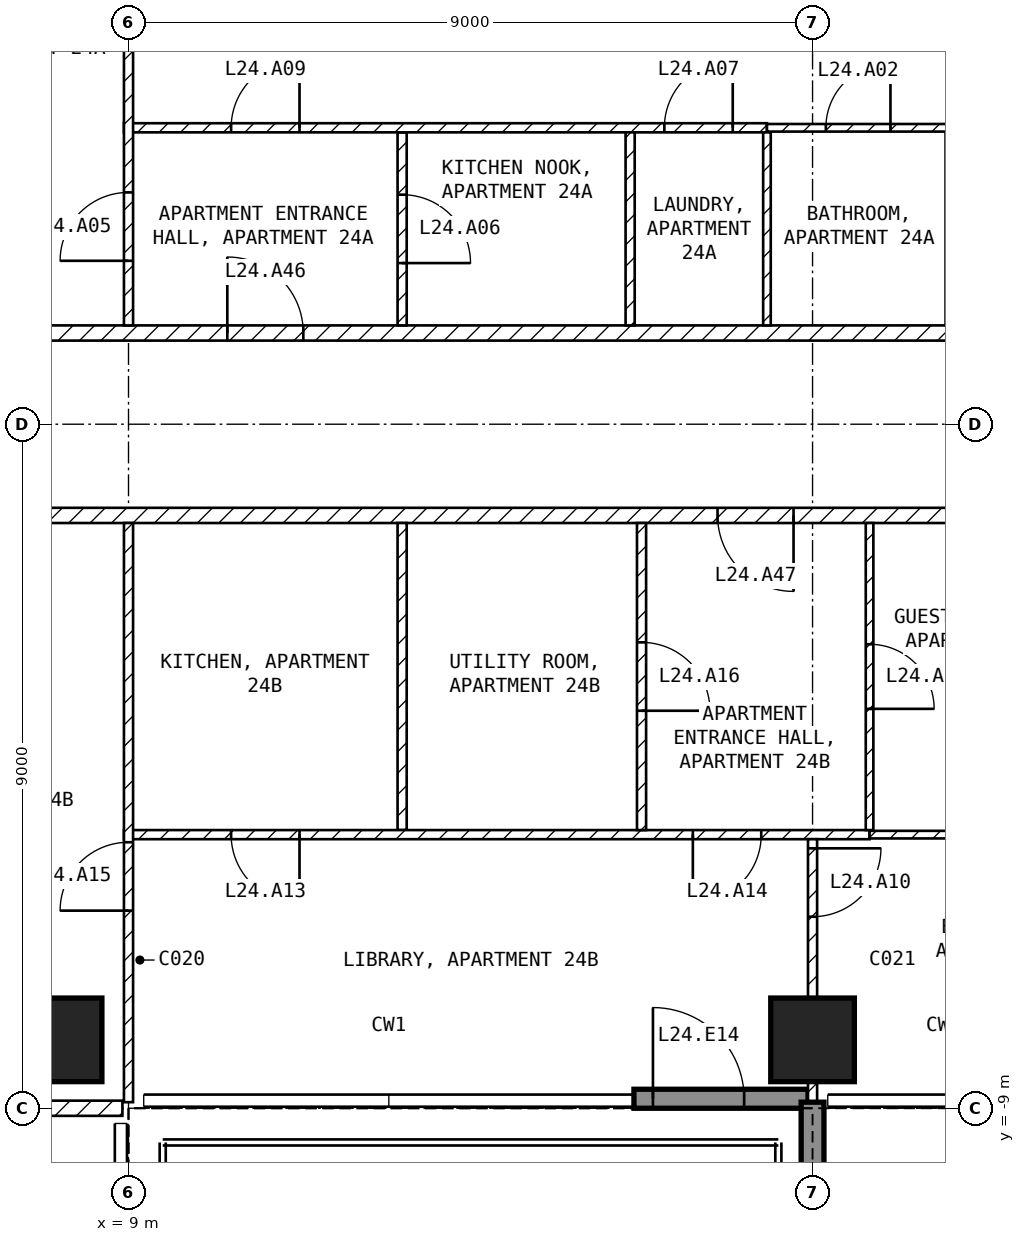
"""IFC4 building model, lengths in metres.
Left out: names, types, materials, properties, quantities, classifications, styles, units other than length and angle.
Written with IfcOpenShell. Run it as: python <this file> out.ifc"""

import sys

from ifc_helpers import new_model, si_unit, direction, frame, frame_2d, origin, origin_2d, place, context, subcontext, project, spatial, rectangle, extrude, element, fill, save


model = new_model("IFC4")
c1 = context("Model", 3, precision=1e-05, world=origin(), true_north=direction((0.0, 1.0)))
c2 = subcontext(c1, "Body", "Model", "MODEL_VIEW")
j1 = project(units=[si_unit("LENGTHUNIT", "METRE"), si_unit("PLANEANGLEUNIT", "RADIAN")], contexts=[c1])
p1 = place(None, origin())
s1 = spatial("IfcSite", under=j1, at=p1, CompositionType="ELEMENT")
p2 = place(p1, origin())
s2 = spatial("IfcBuilding", under=s1, at=p2, CompositionType="ELEMENT")
p3 = place(p2, frame((0.0, 0.0, 105.9)))
s3 = spatial("IfcBuildingStorey", under=s2, at=p3, CompositionType="ELEMENT", Elevation=105.9)
for number, where, z_axis, x_axis in (
    (1, (8.1, -8.1, -0.25), (0.0, 0.0, 1.0), (1.0, 0.0, 0.0)),
    (2, (18.0, -8.1, -0.25), (0.0, 0.0, 1.0), (1.0, 0.0, 0.0)),
):
    element("IfcColumn", number, at=place(p3, frame(where, z_axis=z_axis, x_axis=x_axis)), inside=s3, PredefinedType="COLUMN", context=c2, shape_type="SweptSolid", body=[
        extrude(rectangle(XDim=1.1, YDim=1.1, at=origin_2d()), origin(), (0.0, 0.0, 1.0), 3.5),
    ])
p4 = place(p3, frame((15.65, -8.875, 0.0), z_axis=(0.0, 0.0, 1.0), x_axis=(1.0, 0.0, 0.0)))
e3 = element("IfcWall", 3, at=p4, inside=s3, PredefinedType="SOLIDWALL", context=c2, shape_type="SweptSolid", body=[
    extrude(rectangle(XDim=2.29, YDim=0.25, at=frame_2d((1.145, 0.0))), origin(), (0.0, 0.0, 1.0), 3.25),
])
p5 = place(p4, frame((0.25, 0.0, 0.0)))
e4 = element("IfcOpeningElement", 4, at=p5, cuts=e3, PredefinedType="OPENING", context=c2, shape_type="SweptSolid", body=[
    extrude(rectangle(XDim=1.2, YDim=2.4, at=frame_2d((0.6, 1.2))), frame((0.0, 0.135, 0.0), z_axis=(0.0, -1.0, 0.0), x_axis=(1.0, 0.0, 0.0)), (0.0, 0.0, 1.0), 0.27),
])
p6 = place(p3, frame((18.0, -8.92, 0.0), z_axis=(0.0, 0.0, 1.0), x_axis=(0.0, -1.0, 0.0)))
e5 = element("IfcWall", 5, at=p6, inside=s3, PredefinedType="SOLIDWALL", context=c2, shape_type="SweptSolid", body=[
    extrude(rectangle(XDim=2.82, YDim=0.3, at=frame_2d((1.41, 0.0))), origin(), (0.0, 0.0, 1.0), 3.25),
])
p7 = place(p3, frame((4.4, 1.2, 0.0), z_axis=(0.0, 0.0, 1.0), x_axis=(1.0, 0.0, 0.0)))
e6 = element("IfcWall", 6, at=p7, inside=s3, PredefinedType="PARTITIONING", context=c2, shape_type="SweptSolid", body=[
    extrude(rectangle(XDim=17.2, YDim=0.2, at=frame_2d((8.6, 0.0))), origin(), (0.0, 0.0, 1.0), 3.25),
])
p8 = place(p7, frame((5.9, 0.0, 0.0)))
e7 = element("IfcOpeningElement", 7, at=p8, cuts=e6, PredefinedType="OPENING", context=c2, shape_type="SweptSolid", body=[
    extrude(rectangle(XDim=1.0, YDim=2.1, at=frame_2d((0.5, 1.05))), frame((0.0, 0.11, 0.0), z_axis=(0.0, -1.0, 0.0), x_axis=(1.0, 0.0, 0.0)), (0.0, 0.0, 1.0), 0.22),
])
p9 = place(p3, frame((21.6, -1.2, 0.0), z_axis=(0.0, 0.0, 1.0), x_axis=(-1.0, 0.0, 0.0)))
e8 = element("IfcWall", 8, at=p9, inside=s3, PredefinedType="PARTITIONING", context=c2, shape_type="SweptSolid", body=[
    extrude(rectangle(XDim=17.2, YDim=0.2, at=frame_2d((8.6, 0.0))), origin(), (0.0, 0.0, 1.0), 3.25),
])
p10 = place(p9, frame((3.85, 0.0, 0.0)))
e9 = element("IfcOpeningElement", 9, at=p10, cuts=e8, PredefinedType="OPENING", context=c2, shape_type="SweptSolid", body=[
    extrude(rectangle(XDim=1.0, YDim=2.1, at=frame_2d((0.5, 1.05))), frame((0.0, 0.11, 0.0), z_axis=(0.0, -1.0, 0.0), x_axis=(1.0, 0.0, 0.0)), (0.0, 0.0, 1.0), 0.22),
])
p11 = place(p3, frame((8.92, -9.0, 0.0), z_axis=(0.0, 0.0, 1.0), x_axis=(-1.0, 0.0, 0.0)))
e10 = element("IfcWall", 10, at=p11, inside=s3, PredefinedType="PARTITIONING", context=c2, shape_type="SweptSolid", body=[
    extrude(rectangle(XDim=17.84, YDim=0.2, at=frame_2d((8.92, 0.0))), origin(), (0.0, 0.0, 1.0), 3.25),
])
p12 = place(p11, frame((8.42, 0.0, 0.0)))
e11 = element("IfcOpeningElement", 11, at=p12, cuts=e10, PredefinedType="OPENING", context=c2, shape_type="SweptSolid", body=[
    extrude(rectangle(XDim=1.0, YDim=2.1, at=frame_2d((0.5, 1.05))), frame((0.0, 0.11, 0.0), z_axis=(0.0, -1.0, 0.0), x_axis=(1.0, 0.0, 0.0)), (0.0, 0.0, 1.0), 0.22),
])
p13 = place(p3, frame((12.6, 3.84, 0.0), z_axis=(0.0, 0.0, 1.0), x_axis=(0.0, -1.0, 0.0)))
e12 = element("IfcWall", 12, at=p13, inside=s3, PredefinedType="PARTITIONING", context=c2, shape_type="SweptSolid", body=[
    extrude(rectangle(XDim=2.54, YDim=0.12, at=frame_2d((1.27, 0.0))), origin(), (0.0, 0.0, 1.0), 3.25),
])
p14 = place(p13, frame((0.82, 0.0, 0.0)))
e13 = element("IfcOpeningElement", 13, at=p14, cuts=e12, PredefinedType="OPENING", context=c2, shape_type="SweptSolid", body=[
    extrude(rectangle(XDim=0.9, YDim=2.1, at=frame_2d((0.45, 1.05))), frame((0.0, 0.07, 0.0), z_axis=(0.0, -1.0, 0.0), x_axis=(1.0, 0.0, 0.0)), (0.0, 0.0, 1.0), 0.14),
])
p15 = place(p3, frame((8.94, 3.9, 0.0), z_axis=(0.0, 0.0, 1.0), x_axis=(1.0, 0.0, 0.0)))
e14 = element("IfcWall", 14, at=p15, inside=s3, PredefinedType="PARTITIONING", context=c2, shape_type="SweptSolid", body=[
    extrude(rectangle(XDim=8.46, YDim=0.12, at=frame_2d((4.23, 0.0))), origin(), (0.0, 0.0, 1.0), 3.25),
])
p16 = place(p15, frame((7.11, 0.0, 0.0)))
e15 = element("IfcOpeningElement", 15, at=p16, cuts=e14, PredefinedType="OPENING", context=c2, shape_type="SweptSolid", body=[
    extrude(rectangle(XDim=0.9, YDim=2.1, at=frame_2d((0.45, 1.05))), frame((0.0, 0.07, 0.0), z_axis=(0.0, -1.0, 0.0), x_axis=(1.0, 0.0, 0.0)), (0.0, 0.0, 1.0), 0.14),
])
p17 = place(p15, frame((1.41, 0.0, 0.0)))
e16 = element("IfcOpeningElement", 16, at=p17, cuts=e14, PredefinedType="OPENING", context=c2, shape_type="SweptSolid", body=[
    extrude(rectangle(XDim=0.9, YDim=2.1, at=frame_2d((0.45, 1.05))), frame((0.0, 0.07, 0.0), z_axis=(0.0, -1.0, 0.0), x_axis=(1.0, 0.0, 0.0)), (0.0, 0.0, 1.0), 0.14),
])
p18 = place(p3, frame((9.0, 1.3, 0.0), z_axis=(0.0, 0.0, 1.0), x_axis=(0.0, 1.0, 0.0)))
e17 = element("IfcWall", 17, at=p18, inside=s3, PredefinedType="PARTITIONING", context=c2, shape_type="SweptSolid", body=[
    extrude(rectangle(XDim=7.62, YDim=0.12, at=frame_2d((3.81, 0.0))), origin(), (0.0, 0.0, 1.0), 3.25),
])
p19 = place(p18, frame((0.85, 0.0, 0.0)))
e18 = element("IfcOpeningElement", 18, at=p19, cuts=e17, PredefinedType="OPENING", context=c2, shape_type="SweptSolid", body=[
    extrude(rectangle(XDim=0.9, YDim=2.1, at=frame_2d((0.45, 1.05))), frame((0.0, 0.07, 0.0), z_axis=(0.0, -1.0, 0.0), x_axis=(1.0, 0.0, 0.0)), (0.0, 0.0, 1.0), 0.14),
])
p20 = place(p3, frame((15.6, 3.84, 0.0), z_axis=(0.0, 0.0, 1.0), x_axis=(0.0, -1.0, 0.0)))
e19 = element("IfcWall", 19, at=p20, inside=s3, PredefinedType="PARTITIONING", context=c2, shape_type="SweptSolid", body=[
    extrude(rectangle(XDim=2.54, YDim=0.12, at=frame_2d((1.27, 0.0))), origin(), (0.0, 0.0, 1.0), 3.25),
])
p21 = place(p3, frame((17.4, 3.84, 0.0), z_axis=(0.0, 0.0, 1.0), x_axis=(0.0, -1.0, 0.0)))
e20 = element("IfcWall", 20, at=p21, inside=s3, PredefinedType="PARTITIONING", context=c2, shape_type="SweptSolid", body=[
    extrude(rectangle(XDim=2.54, YDim=0.1, at=frame_2d((1.27, 0.0))), origin(), (0.0, 0.0, 1.0), 3.25),
])
p22 = place(p3, frame((17.4, 3.9, 0.0), z_axis=(0.0, 0.0, 1.0), x_axis=(1.0, 0.0, 0.0)))
e21 = element("IfcWall", 21, at=p22, inside=s3, PredefinedType="PARTITIONING", context=c2, shape_type="SweptSolid", body=[
    extrude(rectangle(XDim=2.4, YDim=0.1, at=frame_2d((1.2, 0.0))), origin(), (0.0, 0.0, 1.0), 3.25),
])
p23 = place(p22, frame((0.775, 0.0, 0.0)))
e22 = element("IfcOpeningElement", 22, at=p23, cuts=e21, PredefinedType="OPENING", context=c2, shape_type="SweptSolid", body=[
    extrude(rectangle(XDim=0.85, YDim=2.1, at=frame_2d((0.425, 1.05))), frame((0.0, 0.06, 0.0), z_axis=(0.0, -1.0, 0.0), x_axis=(1.0, 0.0, 0.0)), (0.0, 0.0, 1.0), 0.12),
])
p24 = place(p3, frame((12.6, -1.3, 0.0), z_axis=(0.0, 0.0, 1.0), x_axis=(0.0, -1.0, 0.0)))
e23 = element("IfcWall", 23, at=p24, inside=s3, PredefinedType="PARTITIONING", context=c2, shape_type="SweptSolid", body=[
    extrude(rectangle(XDim=4.04, YDim=0.12, at=frame_2d((2.02, 0.0))), origin(), (0.0, 0.0, 1.0), 3.25),
])
p25 = place(p3, frame((18.75, -5.4, 0.0), z_axis=(0.0, 0.0, 1.0), x_axis=(-1.0, 0.0, 0.0)))
e24 = element("IfcWall", 24, at=p25, inside=s3, PredefinedType="PARTITIONING", context=c2, shape_type="SweptSolid", body=[
    extrude(rectangle(XDim=9.81, YDim=0.12, at=frame_2d((4.905, 0.0))), origin(), (0.0, 0.0, 1.0), 3.25),
])
p26 = place(p25, frame((7.5, 0.0, 0.0)))
e25 = element("IfcOpeningElement", 25, at=p26, cuts=e24, PredefinedType="OPENING", context=c2, shape_type="SweptSolid", body=[
    extrude(rectangle(XDim=0.9, YDim=2.1, at=frame_2d((0.45, 1.05))), frame((0.0, 0.07, 0.0), z_axis=(0.0, -1.0, 0.0), x_axis=(1.0, 0.0, 0.0)), (0.0, 0.0, 1.0), 0.14),
])
p27 = place(p25, frame((1.425, 0.0, 0.0)))
e26 = element("IfcOpeningElement", 26, at=p27, cuts=e24, PredefinedType="OPENING", context=c2, shape_type="SweptSolid", body=[
    extrude(rectangle(XDim=0.9, YDim=2.1, at=frame_2d((0.45, 1.05))), frame((0.0, 0.07, 0.0), z_axis=(0.0, -1.0, 0.0), x_axis=(1.0, 0.0, 0.0)), (0.0, 0.0, 1.0), 0.14),
])
p28 = place(p3, frame((9.0, -8.92, 0.0), z_axis=(0.0, 0.0, 1.0), x_axis=(0.0, 1.0, 0.0)))
e27 = element("IfcWall", 27, at=p28, inside=s3, PredefinedType="PARTITIONING", context=c2, shape_type="SweptSolid", body=[
    extrude(rectangle(XDim=7.62, YDim=0.12, at=frame_2d((3.81, 0.0))), origin(), (0.0, 0.0, 1.0), 3.25),
])
p29 = place(p28, frame((2.52, 0.0, 0.0)))
e28 = element("IfcOpeningElement", 28, at=p29, cuts=e27, PredefinedType="OPENING", context=c2, shape_type="SweptSolid", body=[
    extrude(rectangle(XDim=0.9, YDim=2.1, at=frame_2d((0.45, 1.05))), frame((0.0, 0.07, 0.0), z_axis=(0.0, -1.0, 0.0), x_axis=(1.0, 0.0, 0.0)), (0.0, 0.0, 1.0), 0.14),
])
p30 = place(p3, frame((15.75, -1.3, 0.0), z_axis=(0.0, 0.0, 1.0), x_axis=(0.0, -1.0, 0.0)))
e29 = element("IfcWall", 29, at=p30, inside=s3, PredefinedType="PARTITIONING", context=c2, shape_type="SweptSolid", body=[
    extrude(rectangle(XDim=4.04, YDim=0.12, at=frame_2d((2.02, 0.0))), origin(), (0.0, 0.0, 1.0), 3.25),
])
p31 = place(p30, frame((1.57, 0.0, 0.0)))
e30 = element("IfcOpeningElement", 30, at=p31, cuts=e29, PredefinedType="OPENING", context=c2, shape_type="SweptSolid", body=[
    extrude(rectangle(XDim=0.9, YDim=2.1, at=frame_2d((0.45, 1.05))), frame((0.0, 0.07, 0.0), z_axis=(0.0, -1.0, 0.0), x_axis=(1.0, 0.0, 0.0)), (0.0, 0.0, 1.0), 0.14),
])
p32 = place(p3, frame((18.75, -1.3, 0.0), z_axis=(0.0, 0.0, 1.0), x_axis=(0.0, -1.0, 0.0)))
e31 = element("IfcWall", 31, at=p32, inside=s3, PredefinedType="PARTITIONING", context=c2, shape_type="SweptSolid", body=[
    extrude(rectangle(XDim=4.04, YDim=0.1, at=frame_2d((2.02, 0.0))), origin(), (0.0, 0.0, 1.0), 3.25),
])
p33 = place(p32, frame((1.595, 0.0, 0.0)))
e32 = element("IfcOpeningElement", 32, at=p33, cuts=e31, PredefinedType="OPENING", context=c2, shape_type="SweptSolid", body=[
    extrude(rectangle(XDim=0.85, YDim=2.1, at=frame_2d((0.425, 1.05))), frame((0.0, 0.06, 0.0), z_axis=(0.0, -1.0, 0.0), x_axis=(1.0, 0.0, 0.0)), (0.0, 0.0, 1.0), 0.12),
])
p34 = place(p3, frame((21.6, -5.4, 0.0), z_axis=(0.0, 0.0, 1.0), x_axis=(-1.0, 0.0, 0.0)))
e33 = element("IfcWall", 33, at=p34, inside=s3, PredefinedType="PARTITIONING", context=c2, shape_type="SweptSolid", body=[
    extrude(rectangle(XDim=2.85, YDim=0.1, at=frame_2d((1.425, 0.0))), origin(), (0.0, 0.0, 1.0), 3.25),
])
p35 = place(p3, frame((18.0, -5.46, 0.0), z_axis=(0.0, 0.0, 1.0), x_axis=(0.0, -1.0, 0.0)))
e34 = element("IfcWall", 34, at=p35, inside=s3, PredefinedType="PARTITIONING", context=c2, shape_type="SweptSolid", body=[
    extrude(rectangle(XDim=3.46, YDim=0.12, at=frame_2d((1.73, 0.0))), origin(), (0.0, 0.0, 1.0), 2.414),
])
p36 = place(p35, frame((0.12, 0.0, 0.0)))
e35 = element("IfcOpeningElement", 35, at=p36, cuts=e34, PredefinedType="OPENING", context=c2, shape_type="SweptSolid", body=[
    extrude(rectangle(XDim=0.9, YDim=2.1, at=frame_2d((0.45, 1.05))), frame((0.0, 0.07, 0.0), z_axis=(0.0, -1.0, 0.0), x_axis=(1.0, 0.0, 0.0)), (0.0, 0.0, 1.0), 0.14),
])
p37 = place(p5, origin())
e36 = element("IfcDoor", 36, at=p37, inside=s3, OperationType="SINGLE_SWING_LEFT", PredefinedType="DOOR", context=c2, shape_type="SweptSolid", body=[
    extrude(rectangle(XDim=1.2, YDim=2.4, at=frame_2d((0.6, 1.2))), frame((0.0, 0.025, 0.0), z_axis=(0.0, -1.0, 0.0), x_axis=(1.0, 0.0, 0.0)), (0.0, 0.0, 1.0), 0.05),
])
fill(e4, e36)
p38 = place(p23, origin())
e37 = element("IfcDoor", 37, at=p38, inside=s3, OperationType="SINGLE_SWING_RIGHT", PredefinedType="DOOR", context=c2, shape_type="SweptSolid", body=[
    extrude(rectangle(XDim=0.85, YDim=2.1, at=frame_2d((0.425, 1.05))), frame((0.0, 0.025, 0.0), z_axis=(0.0, -1.0, 0.0), x_axis=(1.0, 0.0, 0.0)), (0.0, 0.0, 1.0), 0.05),
])
fill(e22, e37)
p39 = place(p19, origin())
e38 = element("IfcDoor", 38, at=p39, inside=s3, OperationType="SINGLE_SWING_LEFT", PredefinedType="DOOR", context=c2, shape_type="SweptSolid", body=[
    extrude(rectangle(XDim=0.9, YDim=2.1, at=frame_2d((0.45, 1.05))), frame((0.0, 0.025, 0.0), z_axis=(0.0, -1.0, 0.0), x_axis=(1.0, 0.0, 0.0)), (0.0, 0.0, 1.0), 0.05),
])
fill(e18, e38)
p40 = place(p14, origin())
e39 = element("IfcDoor", 39, at=p40, inside=s3, OperationType="SINGLE_SWING_RIGHT", PredefinedType="DOOR", context=c2, shape_type="SweptSolid", body=[
    extrude(rectangle(XDim=0.9, YDim=2.1, at=frame_2d((0.45, 1.05))), frame((0.0, 0.025, 0.0), z_axis=(0.0, -1.0, 0.0), x_axis=(1.0, 0.0, 0.0)), (0.0, 0.0, 1.0), 0.05),
])
fill(e13, e39)
p41 = place(p16, origin())
e40 = element("IfcDoor", 40, at=p41, inside=s3, OperationType="SINGLE_SWING_RIGHT", PredefinedType="DOOR", context=c2, shape_type="SweptSolid", body=[
    extrude(rectangle(XDim=0.9, YDim=2.1, at=frame_2d((0.45, 1.05))), frame((0.0, 0.025, 0.0), z_axis=(0.0, -1.0, 0.0), x_axis=(1.0, 0.0, 0.0)), (0.0, 0.0, 1.0), 0.05),
])
fill(e15, e40)
p42 = place(p17, origin())
e41 = element("IfcDoor", 41, at=p42, inside=s3, OperationType="SINGLE_SWING_RIGHT", PredefinedType="DOOR", context=c2, shape_type="SweptSolid", body=[
    extrude(rectangle(XDim=0.9, YDim=2.1, at=frame_2d((0.45, 1.05))), frame((0.0, 0.025, 0.0), z_axis=(0.0, -1.0, 0.0), x_axis=(1.0, 0.0, 0.0)), (0.0, 0.0, 1.0), 0.05),
])
fill(e16, e41)
p43 = place(p36, origin())
e42 = element("IfcDoor", 42, at=p43, inside=s3, OperationType="SINGLE_SWING_LEFT", PredefinedType="DOOR", context=c2, shape_type="SweptSolid", body=[
    extrude(rectangle(XDim=0.9, YDim=2.1, at=frame_2d((0.45, 1.05))), frame((0.0, 0.025, 0.0), z_axis=(0.0, -1.0, 0.0), x_axis=(1.0, 0.0, 0.0)), (0.0, 0.0, 1.0), 0.05),
])
fill(e35, e42)
p44 = place(p33, origin())
e43 = element("IfcDoor", 43, at=p44, inside=s3, OperationType="SINGLE_SWING_RIGHT", PredefinedType="DOOR", context=c2, shape_type="SweptSolid", body=[
    extrude(rectangle(XDim=0.85, YDim=2.1, at=frame_2d((0.425, 1.05))), frame((0.0, 0.025, 0.0), z_axis=(0.0, -1.0, 0.0), x_axis=(1.0, 0.0, 0.0)), (0.0, 0.0, 1.0), 0.05),
])
fill(e32, e43)
p45 = place(p26, origin())
e44 = element("IfcDoor", 44, at=p45, inside=s3, OperationType="SINGLE_SWING_LEFT", PredefinedType="DOOR", context=c2, shape_type="SweptSolid", body=[
    extrude(rectangle(XDim=0.9, YDim=2.1, at=frame_2d((0.45, 1.05))), frame((0.0, 0.025, 0.0), z_axis=(0.0, -1.0, 0.0), x_axis=(1.0, 0.0, 0.0)), (0.0, 0.0, 1.0), 0.05),
])
fill(e25, e44)
p46 = place(p27, origin())
e45 = element("IfcDoor", 45, at=p46, inside=s3, OperationType="SINGLE_SWING_RIGHT", PredefinedType="DOOR", context=c2, shape_type="SweptSolid", body=[
    extrude(rectangle(XDim=0.9, YDim=2.1, at=frame_2d((0.45, 1.05))), frame((0.0, 0.025, 0.0), z_axis=(0.0, -1.0, 0.0), x_axis=(1.0, 0.0, 0.0)), (0.0, 0.0, 1.0), 0.05),
])
fill(e26, e45)
p47 = place(p29, origin())
e46 = element("IfcDoor", 46, at=p47, inside=s3, OperationType="SINGLE_SWING_LEFT", PredefinedType="DOOR", context=c2, shape_type="SweptSolid", body=[
    extrude(rectangle(XDim=0.9, YDim=2.1, at=frame_2d((0.45, 1.05))), frame((0.0, 0.025, 0.0), z_axis=(0.0, -1.0, 0.0), x_axis=(1.0, 0.0, 0.0)), (0.0, 0.0, 1.0), 0.05),
])
fill(e28, e46)
p48 = place(p31, origin())
e47 = element("IfcDoor", 47, at=p48, inside=s3, OperationType="SINGLE_SWING_RIGHT", PredefinedType="DOOR", context=c2, shape_type="SweptSolid", body=[
    extrude(rectangle(XDim=0.9, YDim=2.1, at=frame_2d((0.45, 1.05))), frame((0.0, 0.025, 0.0), z_axis=(0.0, -1.0, 0.0), x_axis=(1.0, 0.0, 0.0)), (0.0, 0.0, 1.0), 0.05),
])
fill(e30, e47)
p49 = place(p8, origin())
e48 = element("IfcDoor", 48, at=p49, inside=s3, OperationType="SINGLE_SWING_LEFT", PredefinedType="DOOR", context=c2, shape_type="SweptSolid", body=[
    extrude(rectangle(XDim=1.0, YDim=2.1, at=frame_2d((0.5, 1.05))), frame((0.0, 0.025, 0.0), z_axis=(0.0, -1.0, 0.0), x_axis=(1.0, 0.0, 0.0)), (0.0, 0.0, 1.0), 0.05),
])
fill(e7, e48)
p50 = place(p10, origin())
e49 = element("IfcDoor", 49, at=p50, inside=s3, OperationType="SINGLE_SWING_LEFT", PredefinedType="DOOR", context=c2, shape_type="SweptSolid", body=[
    extrude(rectangle(XDim=1.0, YDim=2.1, at=frame_2d((0.5, 1.05))), frame((0.0, 0.025, 0.0), z_axis=(0.0, -1.0, 0.0), x_axis=(1.0, 0.0, 0.0)), (0.0, 0.0, 1.0), 0.05),
])
fill(e9, e49)
save(model, sys.argv[1])
